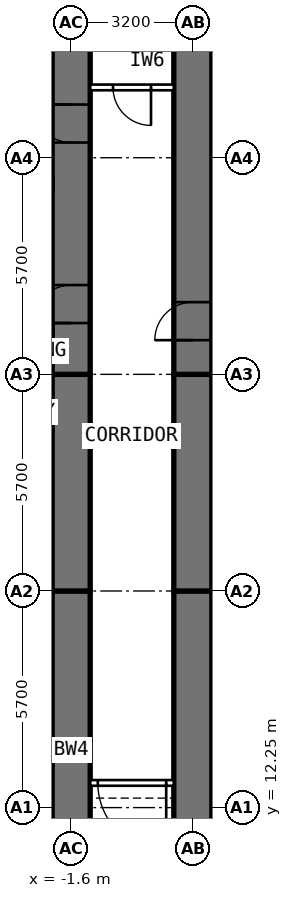
"""IFC4 building model, lengths in metres.
Left out: names, types, materials, properties, quantities, classifications, styles, units other than length and angle.
Written with IfcOpenShell. Run it as: python <this file> out.ifc"""

import sys

from ifc_helpers import new_model, si_unit, direction, frame, frame_2d, origin, place, context, subcontext, project, spatial, rectangle, extrude, element, fill, save


model = new_model("IFC4")
c1 = context("Model", 3, precision=1e-05, world=origin(), true_north=direction((0.0, 1.0)))
c2 = subcontext(c1, "Body", "Model", "MODEL_VIEW")
j1 = project(units=[si_unit("LENGTHUNIT", "METRE"), si_unit("PLANEANGLEUNIT", "RADIAN")], contexts=[c1])
p1 = place(None, origin())
s1 = spatial("IfcSite", under=j1, at=p1, CompositionType="ELEMENT")
p2 = place(p1, origin())
s2 = spatial("IfcBuilding", under=s1, at=p2, CompositionType="ELEMENT")
p3 = place(p2, frame((0.0, 0.0, 39.4)))
s3 = spatial("IfcBuildingStorey", under=s2, at=p3, CompositionType="ELEMENT", Elevation=39.4)
p4 = place(p3, frame((-1.6, 9.6, 0.0), z_axis=(0.0, 0.0, 1.0), x_axis=(0.0, 1.0, 0.0)))
e1 = element("IfcWall", 1, at=p4, inside=s3, PredefinedType="SHEAR", context=c2, shape_type="SweptSolid", body=[
    extrude(rectangle(XDim=8.35, YDim=1.0, at=frame_2d((4.175, 0.0))), origin(), (0.0, 0.0, 1.0), 3.6),
])
p5 = place(p4, frame((1.3, 0.0, 0.0)))
e2 = element("IfcOpeningElement", 2, at=p5, cuts=e1, PredefinedType="OPENING", context=c2, shape_type="SweptSolid", body=[
    extrude(rectangle(XDim=1.0, YDim=2.1, at=frame_2d((0.5, 1.05))), frame((0.0, 0.512, 0.0), z_axis=(0.0, -1.0, 0.0), x_axis=(1.0, 0.0, 0.0)), (0.0, 0.0, 1.0), 1.024),
])
p6 = place(p3, frame((-1.6, 17.95, 0.0), z_axis=(0.0, 0.0, 1.0), x_axis=(0.0, 1.0, 0.0)))
e3 = element("IfcWall", 3, at=p6, inside=s3, PredefinedType="SHEAR", context=c2, shape_type="SweptSolid", body=[
    extrude(rectangle(XDim=5.7, YDim=1.0, at=frame_2d((2.85, 0.0))), origin(), (0.0, 0.0, 1.0), 3.6),
])
p7 = place(p3, frame((-1.6, 23.65, 0.0), z_axis=(0.0, 0.0, 1.0), x_axis=(0.0, 1.0, 0.0)))
e4 = element("IfcWall", 4, at=p7, inside=s3, PredefinedType="SHEAR", context=c2, shape_type="SweptSolid", body=[
    extrude(rectangle(XDim=10.745, YDim=1.0, at=frame_2d((5.373, 0.0))), origin(), (0.0, 0.0, 1.0), 3.6),
])
p8 = place(p7, frame((6.1, 0.0, 0.0)))
e5 = element("IfcOpeningElement", 5, at=p8, cuts=e4, PredefinedType="OPENING", context=c2, shape_type="SweptSolid", body=[
    extrude(rectangle(XDim=1.0, YDim=2.1, at=frame_2d((0.5, 1.05))), frame((0.0, 0.512, 0.0), z_axis=(0.0, -1.0, 0.0), x_axis=(1.0, 0.0, 0.0)), (0.0, 0.0, 1.0), 1.024),
])
p9 = place(p7, frame((1.35, 0.0, 0.0)))
e6 = element("IfcOpeningElement", 6, at=p9, cuts=e4, PredefinedType="OPENING", context=c2, shape_type="SweptSolid", body=[
    extrude(rectangle(XDim=1.0, YDim=2.1, at=frame_2d((0.5, 1.05))), frame((0.0, 0.512, 0.0), z_axis=(0.0, -1.0, 0.0), x_axis=(1.0, 0.0, 0.0)), (0.0, 0.0, 1.0), 1.024),
])
p10 = place(p3, frame((1.6, 9.6, 0.0), z_axis=(0.0, 0.0, 1.0), x_axis=(0.0, 1.0, 0.0)))
e7 = element("IfcWall", 7, at=p10, inside=s3, PredefinedType="SHEAR", context=c2, shape_type="SweptSolid", body=[
    extrude(rectangle(XDim=8.35, YDim=1.0, at=frame_2d((4.175, 0.0))), origin(), (0.0, 0.0, 1.0), 3.6),
])
p11 = place(p10, frame((1.3, 0.0, 0.0)))
e8 = element("IfcOpeningElement", 8, at=p11, cuts=e7, PredefinedType="OPENING", context=c2, shape_type="SweptSolid", body=[
    extrude(rectangle(XDim=1.0, YDim=2.1, at=frame_2d((0.5, 1.05))), frame((0.0, 0.512, 0.0), z_axis=(0.0, -1.0, 0.0), x_axis=(1.0, 0.0, 0.0)), (0.0, 0.0, 1.0), 1.024),
])
p12 = place(p3, frame((1.6, 17.95, 0.0), z_axis=(0.0, 0.0, 1.0), x_axis=(0.0, 1.0, 0.0)))
e9 = element("IfcWall", 9, at=p12, inside=s3, PredefinedType="SHEAR", context=c2, shape_type="SweptSolid", body=[
    extrude(rectangle(XDim=5.7, YDim=1.0, at=frame_2d((2.85, 0.0))), origin(), (0.0, 0.0, 1.0), 3.6),
])
p13 = place(p3, frame((1.6, 23.65, 0.0), z_axis=(0.0, 0.0, 1.0), x_axis=(0.0, 1.0, 0.0)))
e10 = element("IfcWall", 10, at=p13, inside=s3, PredefinedType="SHEAR", context=c2, shape_type="SweptSolid", body=[
    extrude(rectangle(XDim=10.745, YDim=1.0, at=frame_2d((5.373, 0.0))), origin(), (0.0, 0.0, 1.0), 3.6),
])
p14 = place(p13, frame((0.9, 0.0, 0.0)))
e11 = element("IfcOpeningElement", 11, at=p14, cuts=e10, PredefinedType="OPENING", context=c2, shape_type="SweptSolid", body=[
    extrude(rectangle(XDim=1.0, YDim=2.1, at=frame_2d((0.5, 1.05))), frame((0.0, 0.512, 0.0), z_axis=(0.0, -1.0, 0.0), x_axis=(1.0, 0.0, 0.0)), (0.0, 0.0, 1.0), 1.024),
])
p15 = place(p3, frame((-2.1, 31.45, 0.0), z_axis=(0.0, 0.0, 1.0), x_axis=(-1.0, 0.0, 0.0)))
e12 = element("IfcWall", 12, at=p15, inside=s3, PredefinedType="PARTITIONING", context=c2, shape_type="SweptSolid", body=[
    extrude(rectangle(XDim=3.39, YDim=0.12, at=frame_2d((1.695, 0.0))), origin(), (0.0, 0.0, 1.0), 3.35),
])
p16 = place(p15, frame((1.295, 0.0, 0.0)))
e13 = element("IfcOpeningElement", 13, at=p16, cuts=e12, PredefinedType="OPENING", context=c2, shape_type="SweptSolid", body=[
    extrude(rectangle(XDim=0.8, YDim=2.1, at=frame_2d((0.4, 1.05))), frame((0.0, 0.072, 0.0), z_axis=(0.0, -1.0, 0.0), x_axis=(1.0, 0.0, 0.0)), (0.0, 0.0, 1.0), 0.144),
])
p17 = place(p3, frame((2.1, 17.95, 0.0), z_axis=(0.0, 0.0, 1.0), x_axis=(1.0, 0.0, 0.0)))
e14 = element("IfcWall", 14, at=p17, inside=s3, PredefinedType="PARTITIONING", context=c2, shape_type="SweptSolid", body=[
    extrude(rectangle(XDim=8.6, YDim=0.2, at=frame_2d((4.3, 0.0))), origin(), (0.0, 0.0, 1.0), 2.45),
])
p18 = place(p3, frame((1.1, 31.2, 0.0), z_axis=(0.0, 0.0, 1.0), x_axis=(-1.0, 0.0, 0.0)))
e15 = element("IfcWall", 15, at=p18, inside=s3, PredefinedType="PARTITIONING", context=c2, shape_type="SweptSolid", body=[
    extrude(rectangle(XDim=2.2, YDim=0.15, at=frame_2d((1.1, 0.0))), origin(), (0.0, 0.0, 1.0), 3.35),
])
p19 = place(p18, frame((0.6, 0.0, 0.0)))
e16 = element("IfcOpeningElement", 16, at=p19, cuts=e15, PredefinedType="OPENING", context=c2, shape_type="SweptSolid", body=[
    extrude(rectangle(XDim=1.0, YDim=2.1, at=frame_2d((0.5, 1.05))), frame((0.0, 0.087, 0.0), z_axis=(0.0, -1.0, 0.0), x_axis=(1.0, 0.0, 0.0)), (0.0, 0.0, 1.0), 0.174),
])
p20 = place(p3, frame((1.1, 12.9, 0.0), z_axis=(0.0, 0.0, 1.0), x_axis=(-1.0, 0.0, 0.0)))
e17 = element("IfcWall", 17, at=p20, inside=s3, PredefinedType="PARTITIONING", context=c2, shape_type="SweptSolid", body=[
    extrude(rectangle(XDim=2.2, YDim=0.15, at=frame_2d((1.1, 0.0))), origin(), (0.0, 0.0, 1.0), 3.35),
])
p21 = place(p20, frame((0.2, 0.0, 0.0)))
e18 = element("IfcOpeningElement", 18, at=p21, cuts=e17, PredefinedType="OPENING", context=c2, shape_type="SweptSolid", body=[
    extrude(rectangle(XDim=1.8, YDim=2.1, at=frame_2d((0.9, 1.05))), frame((0.0, 0.087, 0.0), z_axis=(0.0, -1.0, 0.0), x_axis=(1.0, 0.0, 0.0)), (0.0, 0.0, 1.0), 0.174),
])
p22 = place(p8, origin())
e19 = element("IfcDoor", 19, at=p22, inside=s3, OperationType="SINGLE_SWING_RIGHT", PredefinedType="DOOR", context=c2, shape_type="SweptSolid", body=[
    extrude(rectangle(XDim=1.0, YDim=2.1, at=frame_2d((0.5, 1.05))), frame((0.0, 0.25, 0.0), z_axis=(0.0, -1.0, 0.0), x_axis=(1.0, 0.0, 0.0)), (0.0, 0.0, 1.0), 0.5),
])
fill(e5, e19)
p23 = place(p14, origin())
e20 = element("IfcDoor", 20, at=p23, inside=s3, OperationType="SINGLE_SWING_LEFT", PredefinedType="DOOR", context=c2, shape_type="SweptSolid", body=[
    extrude(rectangle(XDim=1.0, YDim=2.1, at=frame_2d((0.5, 1.05))), frame((0.0, 0.25, 0.0), z_axis=(0.0, -1.0, 0.0), x_axis=(1.0, 0.0, 0.0)), (0.0, 0.0, 1.0), 0.5),
])
fill(e11, e20)
p24 = place(p19, origin())
e21 = element("IfcDoor", 21, at=p24, inside=s3, OperationType="SINGLE_SWING_LEFT", PredefinedType="DOOR", context=c2, shape_type="SweptSolid", body=[
    extrude(rectangle(XDim=1.0, YDim=2.1, at=frame_2d((0.5, 1.05))), frame((0.0, 0.025, 0.0), z_axis=(0.0, -1.0, 0.0), x_axis=(1.0, 0.0, 0.0)), (0.0, 0.0, 1.0), 0.05),
])
fill(e16, e21)
p25 = place(p21, origin())
e22 = element("IfcDoor", 22, at=p25, inside=s3, OperationType="DOUBLE_DOOR_DOUBLE_SWING", PredefinedType="DOOR", context=c2, shape_type="SweptSolid", body=[
    extrude(rectangle(XDim=1.8, YDim=2.1, at=frame_2d((0.9, 1.05))), frame((0.0, 0.025, 0.0), z_axis=(0.0, -1.0, 0.0), x_axis=(1.0, 0.0, 0.0)), (0.0, 0.0, 1.0), 0.05),
])
fill(e18, e22)
p26 = place(p9, origin())
e23 = element("IfcDoor", 23, at=p26, inside=s3, OperationType="SINGLE_SWING_LEFT", PredefinedType="DOOR", context=c2, shape_type="SweptSolid", body=[
    extrude(rectangle(XDim=1.0, YDim=2.1, at=frame_2d((0.5, 1.05))), frame((0.0, 0.25, 0.0), z_axis=(0.0, -1.0, 0.0), x_axis=(1.0, 0.0, 0.0)), (0.0, 0.0, 1.0), 0.5),
])
fill(e6, e23)
save(model, sys.argv[1])
